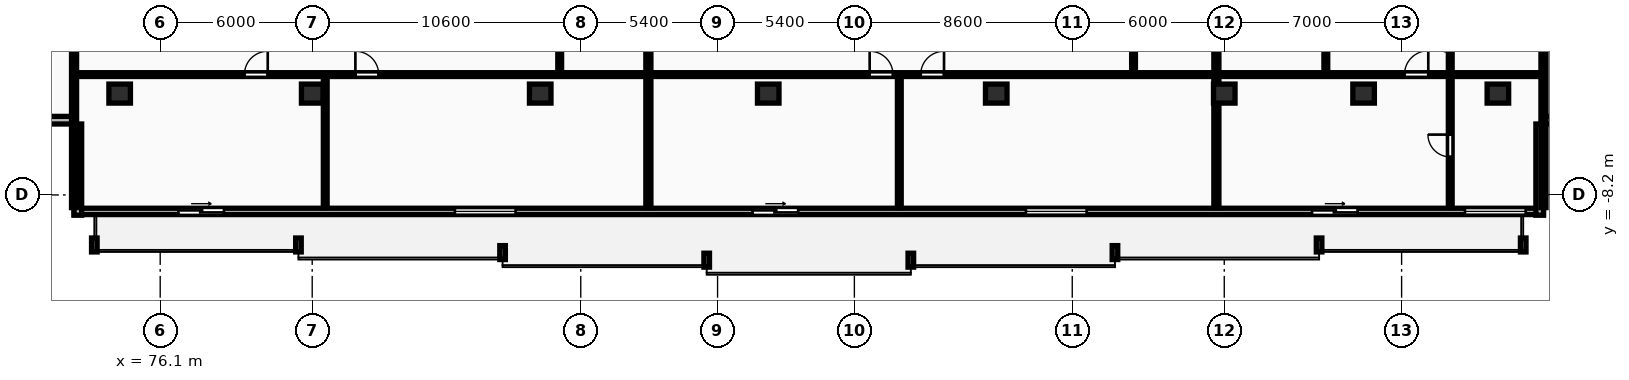
"""IFC4 building model, lengths in metres.
Left out: names, types, materials, properties, quantities, classifications, styles, units other than length and angle.
Written with IfcOpenShell. Run it as: python <this file> out.ifc"""

import sys

from ifc_helpers import new_model, si_unit, direction, frame, frame_2d, origin, origin_2d, place, context, subcontext, project, spatial, rectangle, extrude, element, fill, save


model = new_model("IFC4")
c1 = context("Model", 3, precision=1e-05, world=origin(), true_north=direction((0.0, 1.0)))
c2 = subcontext(c1, "Body", "Model", "MODEL_VIEW")
j1 = project(units=[si_unit("LENGTHUNIT", "METRE"), si_unit("PLANEANGLEUNIT", "RADIAN")], contexts=[c1])
p1 = place(None, origin())
s1 = spatial("IfcSite", under=j1, at=p1, CompositionType="ELEMENT")
p2 = place(p1, origin())
s2 = spatial("IfcBuilding", under=s1, at=p2, CompositionType="ELEMENT")
p3 = place(p2, frame((0.0, 0.0, 93.8)))
s3 = spatial("IfcBuildingStorey", under=s2, at=p3, CompositionType="ELEMENT", Elevation=93.8)
for number, where, z_axis, x_axis in (
    (1, (74.5, -4.2, 0.0), (0.0, 0.0, 1.0), (1.0, 0.0, 0.0)),
    (2, (82.1, -4.2, 0.0), (0.0, 0.0, 1.0), (1.0, 0.0, 0.0)),
    (3, (91.1, -4.2, 0.0), (0.0, 0.0, 1.0), (1.0, 0.0, 0.0)),
    (4, (100.1, -4.2, 0.0), (0.0, 0.0, 1.0), (1.0, 0.0, 0.0)),
    (5, (109.1, -4.2, 0.0), (0.0, 0.0, 1.0), (1.0, 0.0, 0.0)),
    (6, (118.1, -4.2, 0.0), (0.0, 0.0, 1.0), (1.0, 0.0, 0.0)),
    (7, (123.6, -4.2, 0.0), (0.0, 0.0, 1.0), (1.0, 0.0, 0.0)),
    (8, (128.9, -4.2, 0.0), (0.0, 0.0, 1.0), (1.0, 0.0, 0.0)),
):
    element("IfcColumn", number, at=place(p3, frame(where, z_axis=z_axis, x_axis=x_axis)), inside=s3, PredefinedType="COLUMN", context=c2, shape_type="SweptSolid", body=[
        extrude(rectangle(XDim=0.85, YDim=0.75, at=origin_2d()), origin(), (0.0, 0.0, 1.0), 3.25),
    ])
p4 = place(p3, frame((72.7, -8.85, 0.0), z_axis=(0.0, 0.0, 1.0), x_axis=(1.0, 0.0, 0.0)))
e9 = element("IfcWall", 9, at=p4, inside=s3, PredefinedType="STANDARD", context=c2, shape_type="SweptSolid", body=[
    extrude(rectangle(XDim=58.0, YDim=0.25, at=frame_2d((29.0, 0.0))), origin(), (0.0, 0.0, 1.0), 2.97),
])
p5 = place(p4, frame((4.117, 0.0, 0.0)))
e10 = element("IfcOpeningElement", 10, at=p5, cuts=e9, PredefinedType="OPENING", context=c2, shape_type="SweptSolid", body=[
    extrude(rectangle(XDim=1.8, YDim=2.2, at=frame_2d((0.9, 1.1))), frame((0.0, 0.135, 0.0), z_axis=(0.0, -1.0, 0.0), x_axis=(1.0, 0.0, 0.0)), (0.0, 0.0, 1.0), 0.27),
])
p6 = place(p4, frame((15.032, 0.0, 0.85)))
e11 = element("IfcOpeningElement", 11, at=p6, cuts=e9, PredefinedType="OPENING", context=c2, shape_type="SweptSolid", body=[
    extrude(rectangle(XDim=2.4, YDim=1.9, at=frame_2d((1.2, 0.95))), frame((0.0, 0.135, 0.0), z_axis=(0.0, -1.0, 0.0), x_axis=(1.0, 0.0, 0.0)), (0.0, 0.0, 1.0), 0.27),
])
p7 = place(p4, frame((26.781, 0.0, 0.0)))
e12 = element("IfcOpeningElement", 12, at=p7, cuts=e9, PredefinedType="OPENING", context=c2, shape_type="SweptSolid", body=[
    extrude(rectangle(XDim=1.8, YDim=2.2, at=frame_2d((0.9, 1.1))), frame((0.0, 0.135, 0.0), z_axis=(0.0, -1.0, 0.0), x_axis=(1.0, 0.0, 0.0)), (0.0, 0.0, 1.0), 0.27),
])
p8 = place(p4, frame((37.571, 0.0, 0.85)))
e13 = element("IfcOpeningElement", 13, at=p8, cuts=e9, PredefinedType="OPENING", context=c2, shape_type="SweptSolid", body=[
    extrude(rectangle(XDim=2.4, YDim=1.9, at=frame_2d((1.2, 0.95))), frame((0.0, 0.135, 0.0), z_axis=(0.0, -1.0, 0.0), x_axis=(1.0, 0.0, 0.0)), (0.0, 0.0, 1.0), 0.27),
])
p9 = place(p4, frame((48.864, 0.0, 0.0)))
e14 = element("IfcOpeningElement", 14, at=p9, cuts=e9, PredefinedType="OPENING", context=c2, shape_type="SweptSolid", body=[
    extrude(rectangle(XDim=1.8, YDim=2.2, at=frame_2d((0.9, 1.1))), frame((0.0, 0.135, 0.0), z_axis=(0.0, -1.0, 0.0), x_axis=(1.0, 0.0, 0.0)), (0.0, 0.0, 1.0), 0.27),
])
p10 = place(p4, frame((54.9, 0.0, 0.85)))
e15 = element("IfcOpeningElement", 15, at=p10, cuts=e9, PredefinedType="OPENING", context=c2, shape_type="SweptSolid", body=[
    extrude(rectangle(XDim=2.4, YDim=1.9, at=frame_2d((1.2, 0.95))), frame((0.0, 0.135, 0.0), z_axis=(0.0, -1.0, 0.0), x_axis=(1.0, 0.0, 0.0)), (0.0, 0.0, 1.0), 0.27),
])
for number, where, z_axis, x_axis in (
    (16, (130.55, -9.0, 0.0), (0.0, 0.0, 1.0), (0.0, 1.0, 0.0)),
    (17, (130.7, -5.25, 0.0), (0.0, 0.0, 1.0), (1.0, 0.0, 0.0)),
):
    element("IfcWall", number, at=place(p3, frame(where, z_axis=z_axis, x_axis=x_axis)), inside=s3, PredefinedType="STANDARD", context=c2, shape_type="SweptSolid", body=[
        extrude(rectangle(XDim=3.6, YDim=0.3, at=frame_2d((1.8, 0.0))), origin(), (0.0, 0.0, 1.0), 2.97),
    ])
p11 = place(p3, frame((69.1, -5.25, 0.0), z_axis=(0.0, 0.0, 1.0), x_axis=(1.0, 0.0, 0.0)))
e18 = element("IfcWall", 18, at=p11, inside=s3, PredefinedType="STANDARD", context=c2, shape_type="SweptSolid", body=[
    extrude(rectangle(XDim=3.6, YDim=0.3, at=frame_2d((1.8, 0.0))), origin(), (0.0, 0.0, 1.0), 2.97),
])
p12 = place(p3, frame((72.85, -5.4, 0.0), z_axis=(0.0, 0.0, 1.0), x_axis=(0.0, -1.0, 0.0)))
e19 = element("IfcWall", 19, at=p12, inside=s3, PredefinedType="STANDARD", context=c2, shape_type="SweptSolid", body=[
    extrude(rectangle(XDim=3.6, YDim=0.3, at=frame_2d((1.8, 0.0))), origin(), (0.0, 0.0, 1.0), 2.97),
])
for number, where, z_axis, x_axis in (
    (20, (72.7, -8.7, 0.0), (0.0, 0.0, 1.0), (0.0, 1.0, 0.0)),
    (21, (130.7, -8.7, 0.0), (0.0, 0.0, 1.0), (0.0, 1.0, 0.0)),
    (22, (95.369, -8.7, 0.0), (0.0, 0.0, 1.0), (0.0, 1.0, 0.0)),
):
    element("IfcWall", number, at=place(p3, frame(where, z_axis=z_axis, x_axis=x_axis)), inside=s3, PredefinedType="PARTITIONING", context=c2, shape_type="SweptSolid", body=[
        extrude(rectangle(XDim=24.57, YDim=0.2, at=frame_2d((12.285, 0.0))), origin(), (0.0, 0.0, 1.0), 2.97),
    ])
p13 = place(p3, frame((91.869, -3.39, 0.0), z_axis=(0.0, 0.0, 1.0), x_axis=(0.0, 1.0, 0.0)))
e23 = element("IfcWall", 23, at=p13, inside=s3, PredefinedType="PARTITIONING", context=c2, shape_type="SweptSolid", body=[
    extrude(rectangle(XDim=19.28, YDim=0.15, at=frame_2d((9.64, 0.0))), origin(), (0.0, 0.0, 1.0), 2.97),
])
p14 = place(p13, frame((2.406, 0.0, 0.0)))
e24 = element("IfcOpeningElement", 24, at=p14, cuts=e23, PredefinedType="OPENING", context=c2, shape_type="SweptSolid", body=[
    extrude(rectangle(XDim=0.96, YDim=2.1, at=frame_2d((0.48, 1.05))), frame((0.0, 0.085, 0.0), z_axis=(0.0, -1.0, 0.0), x_axis=(1.0, 0.0, 0.0)), (0.0, 0.0, 1.0), 0.17),
])
p15 = place(p13, frame((6.133, 0.0, 0.0)))
e25 = element("IfcOpeningElement", 25, at=p15, cuts=e23, PredefinedType="OPENING", context=c2, shape_type="SweptSolid", body=[
    extrude(rectangle(XDim=0.88, YDim=2.06, at=frame_2d((0.44, 1.03))), frame((0.0, 0.085, 0.0), z_axis=(0.0, -1.0, 0.0), x_axis=(1.0, 0.0, 0.0)), (0.0, 0.0, 1.0), 0.17),
])
p16 = place(p13, frame((7.674, 0.0, 0.0)))
e26 = element("IfcOpeningElement", 26, at=p16, cuts=e23, PredefinedType="OPENING", context=c2, shape_type="SweptSolid", body=[
    extrude(rectangle(XDim=0.84, YDim=2.04, at=frame_2d((0.42, 1.02))), frame((0.0, 0.085, 0.0), z_axis=(0.0, -1.0, 0.0), x_axis=(1.0, 0.0, 0.0)), (0.0, 0.0, 1.0), 0.17),
])
p17 = place(p3, frame((82.615, -8.7, 0.0), z_axis=(0.0, 0.0, 1.0), x_axis=(0.0, 1.0, 0.0)))
e27 = element("IfcWall", 27, at=p17, inside=s3, PredefinedType="PARTITIONING", context=c2, shape_type="SweptSolid", body=[
    extrude(rectangle(XDim=5.17, YDim=0.15, at=frame_2d((2.585, 0.0))), origin(), (0.0, 0.0, 1.0), 2.97),
])
p18 = place(p3, frame((72.78, -3.45, 0.0), z_axis=(0.0, 0.0, 1.0), x_axis=(1.0, 0.0, 0.0)))
e28 = element("IfcWall", 28, at=p18, inside=s3, PredefinedType="PARTITIONING", context=c2, shape_type="SweptSolid", body=[
    extrude(rectangle(XDim=22.509, YDim=0.15, at=frame_2d((11.254, 0.0))), origin(), (0.0, 0.0, 1.0), 2.97),
])
p19 = place(p18, frame((6.645, 0.0, 0.0)))
e29 = element("IfcOpeningElement", 29, at=p19, cuts=e28, PredefinedType="OPENING", context=c2, shape_type="SweptSolid", body=[
    extrude(rectangle(XDim=0.92, YDim=2.08, at=frame_2d((0.46, 1.04))), frame((0.0, 0.085, 0.0), z_axis=(0.0, -1.0, 0.0), x_axis=(1.0, 0.0, 0.0)), (0.0, 0.0, 1.0), 0.17),
])
p20 = place(p18, frame((11.024, 0.0, 0.0)))
e30 = element("IfcOpeningElement", 30, at=p20, cuts=e28, PredefinedType="OPENING", context=c2, shape_type="SweptSolid", body=[
    extrude(rectangle(XDim=0.92, YDim=2.08, at=frame_2d((0.46, 1.04))), frame((0.0, 0.085, 0.0), z_axis=(0.0, -1.0, 0.0), x_axis=(1.0, 0.0, 0.0)), (0.0, 0.0, 1.0), 0.17),
])
p21 = place(p3, frame((117.789, -8.7, 0.0), z_axis=(0.0, 0.0, 1.0), x_axis=(0.0, 1.0, 0.0)))
e31 = element("IfcWall", 31, at=p21, inside=s3, PredefinedType="PARTITIONING", context=c2, shape_type="SweptSolid", body=[
    extrude(rectangle(XDim=24.57, YDim=0.2, at=frame_2d((12.285, 0.0))), origin(), (0.0, 0.0, 1.0), 2.97),
])
p22 = place(p3, frame((114.519, -3.39, 0.0), z_axis=(0.0, 0.0, 1.0), x_axis=(0.0, 1.0, 0.0)))
e32 = element("IfcWall", 32, at=p22, inside=s3, PredefinedType="PARTITIONING", context=c2, shape_type="SweptSolid", body=[
    extrude(rectangle(XDim=19.28, YDim=0.15, at=frame_2d((9.64, 0.0))), origin(), (0.0, 0.0, 1.0), 2.97),
])
p23 = place(p22, frame((2.406, 0.0, 0.0)))
e33 = element("IfcOpeningElement", 33, at=p23, cuts=e32, PredefinedType="OPENING", context=c2, shape_type="SweptSolid", body=[
    extrude(rectangle(XDim=0.96, YDim=2.1, at=frame_2d((0.48, 1.05))), frame((0.0, 0.085, 0.0), z_axis=(0.0, -1.0, 0.0), x_axis=(1.0, 0.0, 0.0)), (0.0, 0.0, 1.0), 0.17),
])
p24 = place(p22, frame((6.133, 0.0, 0.0)))
e34 = element("IfcOpeningElement", 34, at=p24, cuts=e32, PredefinedType="OPENING", context=c2, shape_type="SweptSolid", body=[
    extrude(rectangle(XDim=0.88, YDim=2.06, at=frame_2d((0.44, 1.03))), frame((0.0, 0.085, 0.0), z_axis=(0.0, -1.0, 0.0), x_axis=(1.0, 0.0, 0.0)), (0.0, 0.0, 1.0), 0.17),
])
p25 = place(p22, frame((9.22, 0.0, 0.0)))
e35 = element("IfcOpeningElement", 35, at=p25, cuts=e32, PredefinedType="OPENING", context=c2, shape_type="SweptSolid", body=[
    extrude(rectangle(XDim=0.84, YDim=2.04, at=frame_2d((0.42, 1.02))), frame((0.0, 0.085, 0.0), z_axis=(0.0, -1.0, 0.0), x_axis=(1.0, 0.0, 0.0)), (0.0, 0.0, 1.0), 0.17),
])
p26 = place(p3, frame((105.274, -8.7, 0.0), z_axis=(0.0, 0.0, 1.0), x_axis=(0.0, 1.0, 0.0)))
e36 = element("IfcWall", 36, at=p26, inside=s3, PredefinedType="PARTITIONING", context=c2, shape_type="SweptSolid", body=[
    extrude(rectangle(XDim=5.17, YDim=0.15, at=frame_2d((2.585, 0.0))), origin(), (0.0, 0.0, 1.0), 2.97),
])
p27 = place(p3, frame((95.449, -3.45, 0.0), z_axis=(0.0, 0.0, 1.0), x_axis=(1.0, 0.0, 0.0)))
e37 = element("IfcWall", 37, at=p27, inside=s3, PredefinedType="PARTITIONING", context=c2, shape_type="SweptSolid", body=[
    extrude(rectangle(XDim=22.26, YDim=0.15, at=frame_2d((11.13, 0.0))), origin(), (0.0, 0.0, 1.0), 2.97),
])
p28 = place(p27, frame((8.655, 0.0, 0.0)))
e38 = element("IfcOpeningElement", 38, at=p28, cuts=e37, PredefinedType="OPENING", context=c2, shape_type="SweptSolid", body=[
    extrude(rectangle(XDim=0.92, YDim=2.08, at=frame_2d((0.46, 1.04))), frame((0.0, 0.085, 0.0), z_axis=(0.0, -1.0, 0.0), x_axis=(1.0, 0.0, 0.0)), (0.0, 0.0, 1.0), 0.17),
])
p29 = place(p27, frame((10.67, 0.0, 0.0)))
e39 = element("IfcOpeningElement", 39, at=p29, cuts=e37, PredefinedType="OPENING", context=c2, shape_type="SweptSolid", body=[
    extrude(rectangle(XDim=0.92, YDim=2.08, at=frame_2d((0.46, 1.04))), frame((0.0, 0.085, 0.0), z_axis=(0.0, -1.0, 0.0), x_axis=(1.0, 0.0, 0.0)), (0.0, 0.0, 1.0), 0.17),
])
p30 = place(p3, frame((122.109, -3.39, 0.0), z_axis=(0.0, 0.0, 1.0), x_axis=(0.0, 1.0, 0.0)))
e40 = element("IfcWall", 40, at=p30, inside=s3, PredefinedType="PARTITIONING", context=c2, shape_type="SweptSolid", body=[
    extrude(rectangle(XDim=5.0, YDim=0.15, at=frame_2d((2.5, 0.0))), origin(), (0.0, 0.0, 1.0), 2.97),
])
p31 = place(p30, frame((2.06, 0.0, 0.0)))
e41 = element("IfcOpeningElement", 41, at=p31, cuts=e40, PredefinedType="OPENING", context=c2, shape_type="SweptSolid", body=[
    extrude(rectangle(XDim=0.88, YDim=2.06, at=frame_2d((0.44, 1.03))), frame((0.0, 0.085, 0.0), z_axis=(0.0, -1.0, 0.0), x_axis=(1.0, 0.0, 0.0)), (0.0, 0.0, 1.0), 0.17),
])
p32 = place(p3, frame((127.02, -8.7, 0.0), z_axis=(0.0, 0.0, 1.0), x_axis=(0.0, 1.0, 0.0)))
e42 = element("IfcWall", 42, at=p32, inside=s3, PredefinedType="PARTITIONING", context=c2, shape_type="SweptSolid", body=[
    extrude(rectangle(XDim=10.31, YDim=0.15, at=frame_2d((5.155, 0.0))), origin(), (0.0, 0.0, 1.0), 2.97),
])
p33 = place(p32, frame((6.12, 0.0, 0.0)))
e43 = element("IfcOpeningElement", 43, at=p33, cuts=e42, PredefinedType="OPENING", context=c2, shape_type="SweptSolid", body=[
    extrude(rectangle(XDim=0.84, YDim=2.04, at=frame_2d((0.42, 1.02))), frame((0.0, 0.085, 0.0), z_axis=(0.0, -1.0, 0.0), x_axis=(1.0, 0.0, 0.0)), (0.0, 0.0, 1.0), 0.17),
])
p34 = place(p32, frame((8.04, 0.0, 0.0)))
e44 = element("IfcOpeningElement", 44, at=p34, cuts=e42, PredefinedType="OPENING", context=c2, shape_type="SweptSolid", body=[
    extrude(rectangle(XDim=0.84, YDim=2.04, at=frame_2d((0.42, 1.02))), frame((0.0, 0.085, 0.0), z_axis=(0.0, -1.0, 0.0), x_axis=(1.0, 0.0, 0.0)), (0.0, 0.0, 1.0), 0.17),
])
p35 = place(p32, frame((2.001, 0.0, 0.0)))
e45 = element("IfcOpeningElement", 45, at=p35, cuts=e42, PredefinedType="OPENING", context=c2, shape_type="SweptSolid", body=[
    extrude(rectangle(XDim=0.88, YDim=2.06, at=frame_2d((0.44, 1.03))), frame((0.0, 0.085, 0.0), z_axis=(0.0, -1.0, 0.0), x_axis=(1.0, 0.0, 0.0)), (0.0, 0.0, 1.0), 0.17),
])
p36 = place(p3, frame((117.869, -3.45, 0.0), z_axis=(0.0, 0.0, 1.0), x_axis=(1.0, 0.0, 0.0)))
e46 = element("IfcWall", 46, at=p36, inside=s3, PredefinedType="PARTITIONING", context=c2, shape_type="SweptSolid", body=[
    extrude(rectangle(XDim=12.751, YDim=0.15, at=frame_2d((6.376, 0.0))), origin(), (0.0, 0.0, 1.0), 2.97),
])
p37 = place(p36, frame((7.344, 0.0, 0.0)))
e47 = element("IfcOpeningElement", 47, at=p37, cuts=e46, PredefinedType="OPENING", context=c2, shape_type="SweptSolid", body=[
    extrude(rectangle(XDim=0.94, YDim=2.1, at=frame_2d((0.47, 1.05))), frame((0.0, 0.085, 0.0), z_axis=(0.0, -1.0, 0.0), x_axis=(1.0, 0.0, 0.0)), (0.0, 0.0, 1.0), 0.17),
])
p38 = place(p5, origin())
e48 = element("IfcDoor", 48, at=p38, inside=s3, OperationType="SLIDING_TO_RIGHT", PredefinedType="DOOR", context=c2, shape_type="SweptSolid", body=[
    extrude(rectangle(XDim=1.8, YDim=2.2, at=frame_2d((0.9, 1.1))), frame((0.0, 0.025, 0.0), z_axis=(0.0, -1.0, 0.0), x_axis=(1.0, 0.0, 0.0)), (0.0, 0.0, 1.0), 0.05),
])
fill(e10, e48)
p39 = place(p6, origin())
e49 = element("IfcWindow", 49, at=p39, inside=s3, PartitioningType="DOUBLE_PANEL_VERTICAL", PredefinedType="WINDOW", context=c2, shape_type="SweptSolid", body=[
    extrude(rectangle(XDim=2.4, YDim=1.9, at=frame_2d((1.2, 0.95))), frame((0.0, 0.03, 0.0), z_axis=(0.0, -1.0, 0.0), x_axis=(1.0, 0.0, 0.0)), (0.0, 0.0, 1.0), 0.06),
])
fill(e11, e49)
p40 = place(p7, origin())
e50 = element("IfcDoor", 50, at=p40, inside=s3, OperationType="SLIDING_TO_RIGHT", PredefinedType="DOOR", context=c2, shape_type="SweptSolid", body=[
    extrude(rectangle(XDim=1.8, YDim=2.2, at=frame_2d((0.9, 1.1))), frame((0.0, 0.025, 0.0), z_axis=(0.0, -1.0, 0.0), x_axis=(1.0, 0.0, 0.0)), (0.0, 0.0, 1.0), 0.05),
])
fill(e12, e50)
p41 = place(p8, origin())
e51 = element("IfcWindow", 51, at=p41, inside=s3, PartitioningType="DOUBLE_PANEL_VERTICAL", PredefinedType="WINDOW", context=c2, shape_type="SweptSolid", body=[
    extrude(rectangle(XDim=2.4, YDim=1.9, at=frame_2d((1.2, 0.95))), frame((0.0, 0.03, 0.0), z_axis=(0.0, -1.0, 0.0), x_axis=(1.0, 0.0, 0.0)), (0.0, 0.0, 1.0), 0.06),
])
fill(e13, e51)
p42 = place(p9, origin())
e52 = element("IfcDoor", 52, at=p42, inside=s3, OperationType="SLIDING_TO_RIGHT", PredefinedType="DOOR", context=c2, shape_type="SweptSolid", body=[
    extrude(rectangle(XDim=1.8, YDim=2.2, at=frame_2d((0.9, 1.1))), frame((0.0, 0.025, 0.0), z_axis=(0.0, -1.0, 0.0), x_axis=(1.0, 0.0, 0.0)), (0.0, 0.0, 1.0), 0.05),
])
fill(e14, e52)
p43 = place(p10, origin())
e53 = element("IfcWindow", 53, at=p43, inside=s3, PartitioningType="DOUBLE_PANEL_VERTICAL", PredefinedType="WINDOW", context=c2, shape_type="SweptSolid", body=[
    extrude(rectangle(XDim=2.4, YDim=1.9, at=frame_2d((1.2, 0.95))), frame((0.0, 0.03, 0.0), z_axis=(0.0, -1.0, 0.0), x_axis=(1.0, 0.0, 0.0)), (0.0, 0.0, 1.0), 0.06),
])
fill(e15, e53)
p44 = place(p19, origin())
e54 = element("IfcDoor", 54, at=p44, inside=s3, OperationType="SINGLE_SWING_RIGHT", PredefinedType="DOOR", context=c2, shape_type="SweptSolid", body=[
    extrude(rectangle(XDim=0.92, YDim=2.08, at=frame_2d((0.46, 1.04))), frame((0.0, 0.025, 0.0), z_axis=(0.0, -1.0, 0.0), x_axis=(1.0, 0.0, 0.0)), (0.0, 0.0, 1.0), 0.05),
])
fill(e29, e54)
p45 = place(p20, origin())
e55 = element("IfcDoor", 55, at=p45, inside=s3, OperationType="SINGLE_SWING_LEFT", PredefinedType="DOOR", context=c2, shape_type="SweptSolid", body=[
    extrude(rectangle(XDim=0.92, YDim=2.08, at=frame_2d((0.46, 1.04))), frame((0.0, 0.025, 0.0), z_axis=(0.0, -1.0, 0.0), x_axis=(1.0, 0.0, 0.0)), (0.0, 0.0, 1.0), 0.05),
])
fill(e30, e55)
p46 = place(p28, origin())
e56 = element("IfcDoor", 56, at=p46, inside=s3, OperationType="SINGLE_SWING_LEFT", PredefinedType="DOOR", context=c2, shape_type="SweptSolid", body=[
    extrude(rectangle(XDim=0.92, YDim=2.08, at=frame_2d((0.46, 1.04))), frame((0.0, 0.025, 0.0), z_axis=(0.0, -1.0, 0.0), x_axis=(1.0, 0.0, 0.0)), (0.0, 0.0, 1.0), 0.05),
])
fill(e38, e56)
p47 = place(p29, origin())
e57 = element("IfcDoor", 57, at=p47, inside=s3, OperationType="SINGLE_SWING_RIGHT", PredefinedType="DOOR", context=c2, shape_type="SweptSolid", body=[
    extrude(rectangle(XDim=0.92, YDim=2.08, at=frame_2d((0.46, 1.04))), frame((0.0, 0.025, 0.0), z_axis=(0.0, -1.0, 0.0), x_axis=(1.0, 0.0, 0.0)), (0.0, 0.0, 1.0), 0.05),
])
fill(e39, e57)
p48 = place(p33, origin())
e58 = element("IfcDoor", 58, at=p48, inside=s3, OperationType="SINGLE_SWING_RIGHT", PredefinedType="DOOR", context=c2, shape_type="SweptSolid", body=[
    extrude(rectangle(XDim=0.84, YDim=2.04, at=frame_2d((0.42, 1.02))), frame((0.0, 0.025, 0.0), z_axis=(0.0, -1.0, 0.0), x_axis=(1.0, 0.0, 0.0)), (0.0, 0.0, 1.0), 0.05),
])
fill(e43, e58)
p49 = place(p35, origin())
e59 = element("IfcDoor", 59, at=p49, inside=s3, OperationType="SINGLE_SWING_RIGHT", PredefinedType="DOOR", context=c2, shape_type="SweptSolid", body=[
    extrude(rectangle(XDim=0.88, YDim=2.06, at=frame_2d((0.44, 1.03))), frame((0.0, 0.025, 0.0), z_axis=(0.0, -1.0, 0.0), x_axis=(1.0, 0.0, 0.0)), (0.0, 0.0, 1.0), 0.05),
])
fill(e45, e59)
p50 = place(p37, origin())
e60 = element("IfcDoor", 60, at=p50, inside=s3, OperationType="SINGLE_SWING_RIGHT", PredefinedType="DOOR", context=c2, shape_type="SweptSolid", body=[
    extrude(rectangle(XDim=0.94, YDim=2.1, at=frame_2d((0.47, 1.05))), frame((0.0, 0.025, 0.0), z_axis=(0.0, -1.0, 0.0), x_axis=(1.0, 0.0, 0.0)), (0.0, 0.0, 1.0), 0.05),
])
fill(e47, e60)
save(model, sys.argv[1])
